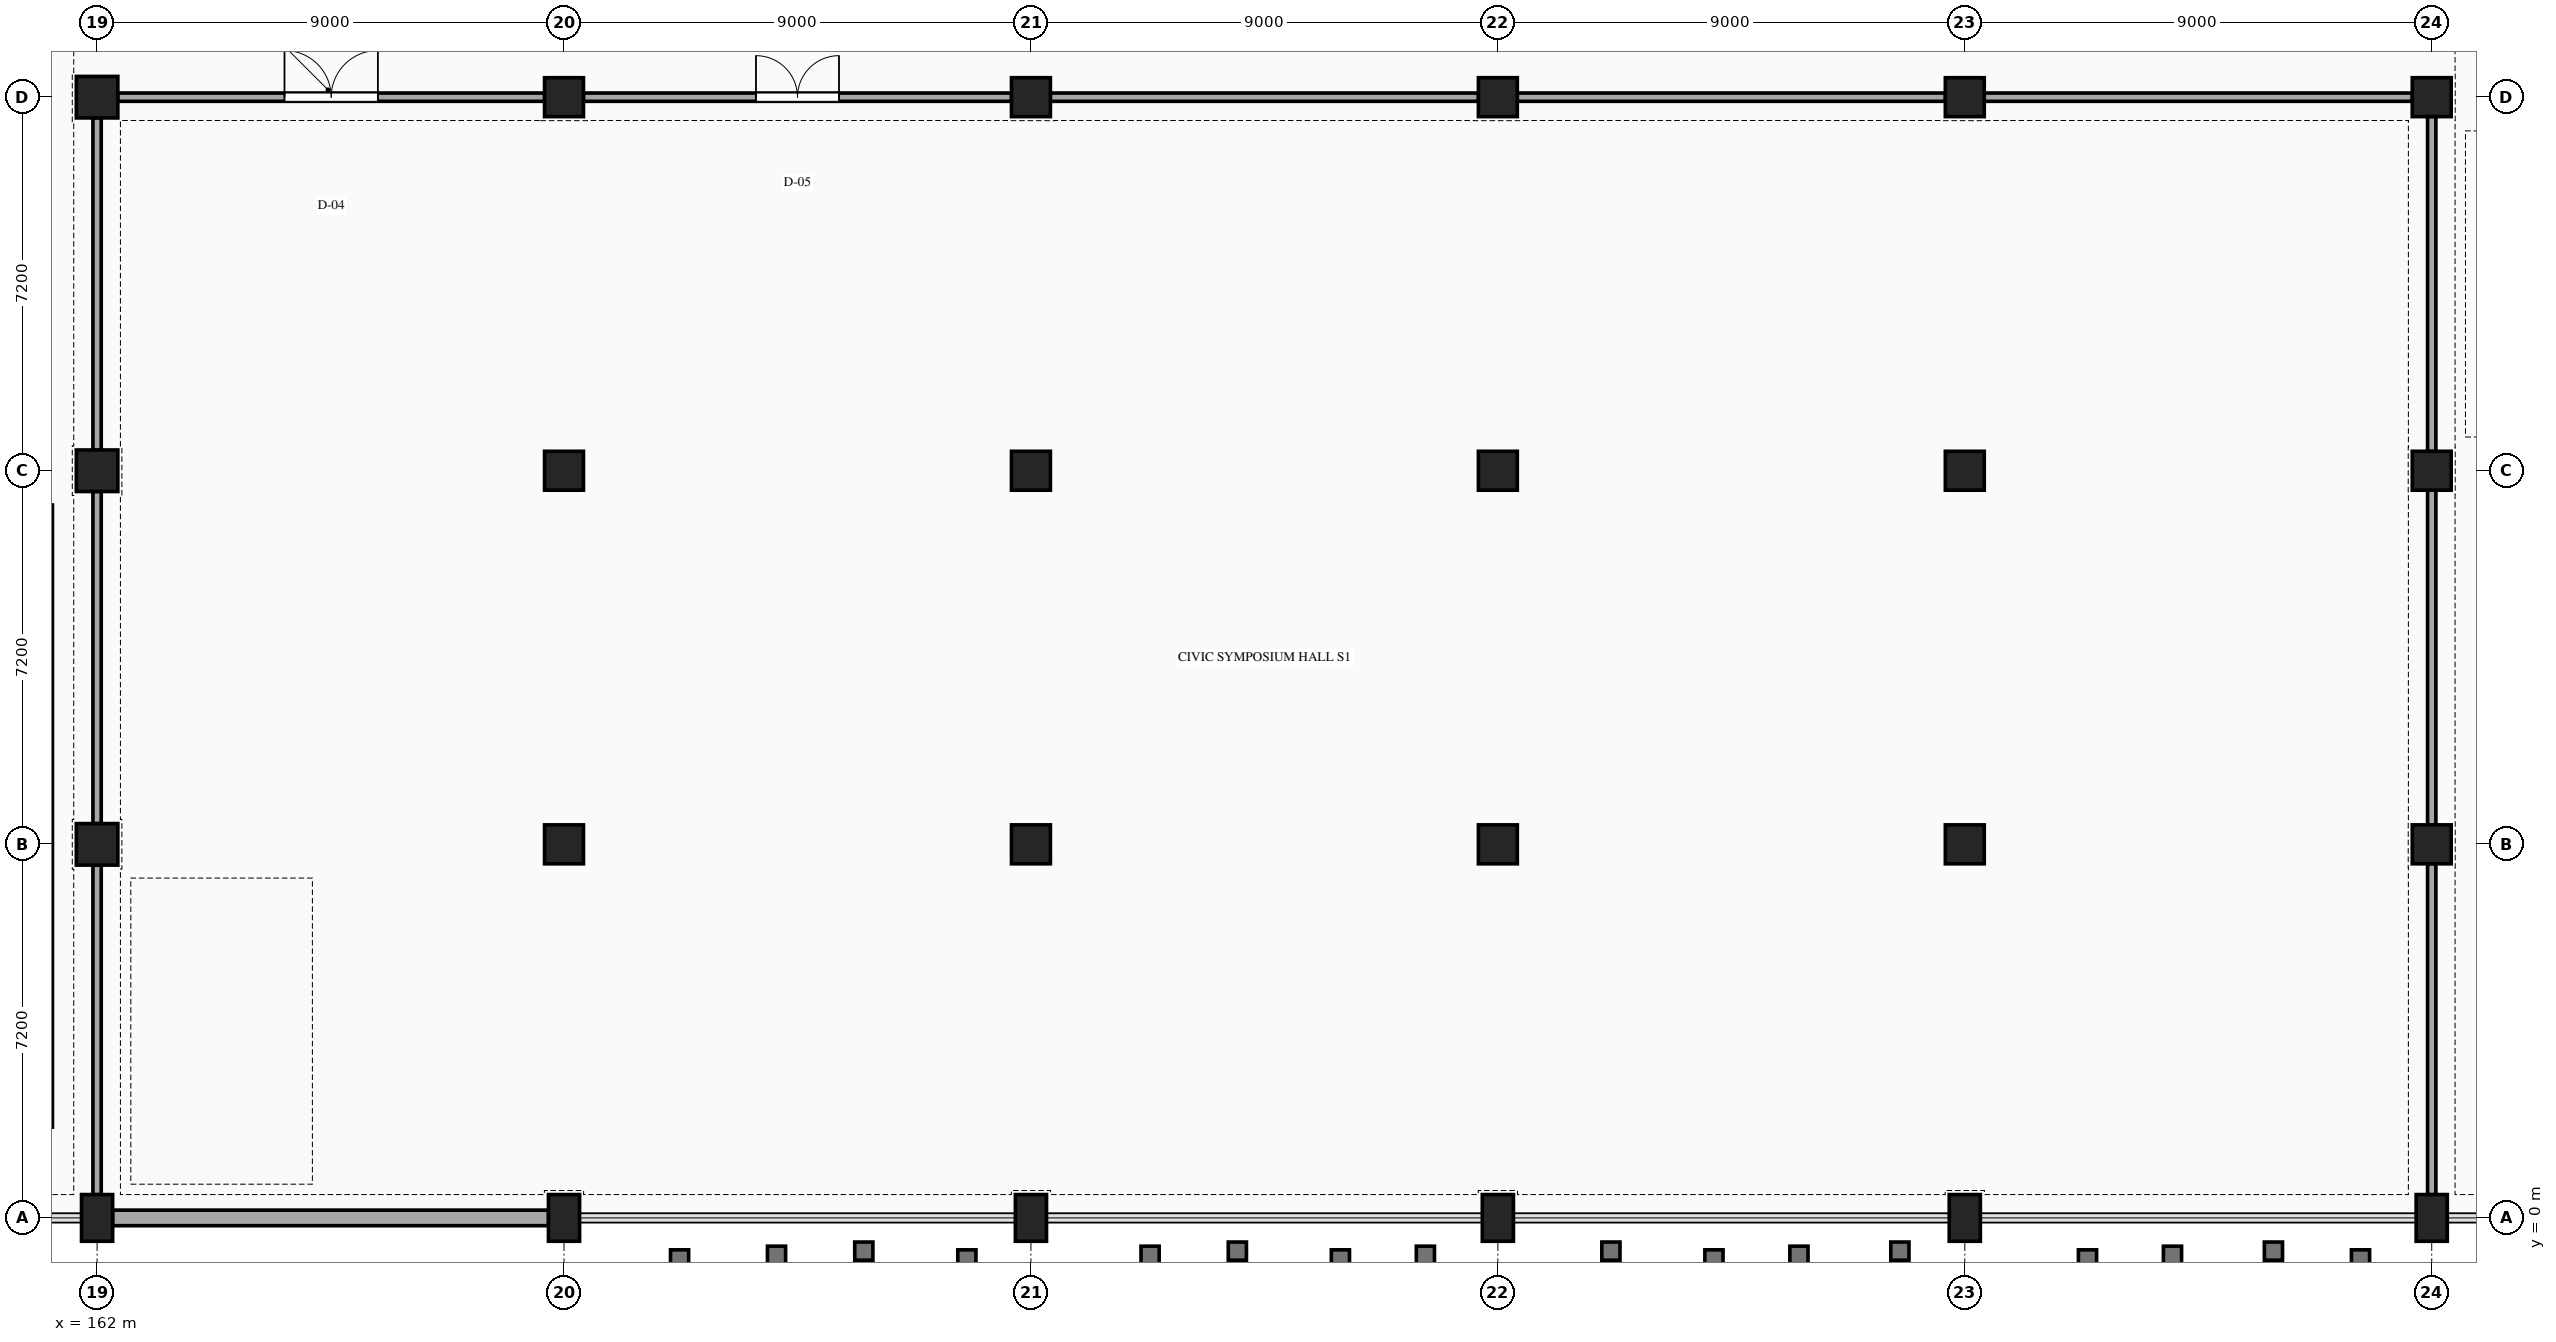
"""IFC4 building model, lengths in metres.
Left out: names, types, materials, properties, quantities, classifications, styles, units other than length and angle.
Written with IfcOpenShell. Run it as: python <this file> out.ifc"""

import sys

from ifc_helpers import new_model, si_unit, direction, frame, frame_2d, origin, origin_2d, place, context, subcontext, project, spatial, rectangle, extrude, element, fill, save


model = new_model("IFC4")
c1 = context("Model", 3, precision=1e-05, world=origin(), true_north=direction((0.0, 1.0)))
c2 = subcontext(c1, "Body", "Model", "MODEL_VIEW")
j1 = project(units=[si_unit("LENGTHUNIT", "METRE"), si_unit("PLANEANGLEUNIT", "RADIAN")], contexts=[c1])
p1 = place(None, origin())
s1 = spatial("IfcSite", under=j1, at=p1, CompositionType="ELEMENT")
p2 = place(p1, origin())
s2 = spatial("IfcBuilding", under=s1, at=p2, CompositionType="ELEMENT")
p3 = place(p2, origin())
s3 = spatial("IfcBuildingStorey", under=s2, at=p3, CompositionType="ELEMENT", Elevation=0.0)
p4 = place(p3, frame((162.0, 0.0, 0.0), z_axis=(0.0, 0.0, 1.0), x_axis=(1.0, 0.0, 0.0)))
e1 = element("IfcColumn", 1, at=p4, inside=s3, PredefinedType="COLUMN", context=c2, shape_type="SweptSolid", body=[
    extrude(rectangle(XDim=0.6, YDim=0.9, at=origin_2d()), origin(), (0.0, 0.0, 1.0), 5.4),
])
for number, where, z_axis, x_axis in (
    (2, (162.0, 7.2, 0.0), (0.0, 0.0, 1.0), (1.0, 0.0, 0.0)),
    (3, (162.0, 14.4, 0.0), (0.0, 0.0, 1.0), (1.0, 0.0, 0.0)),
    (4, (162.0, 21.6, 0.0), (0.0, 0.0, 1.0), (1.0, 0.0, 0.0)),
):
    element("IfcColumn", number, at=place(p3, frame(where, z_axis=z_axis, x_axis=x_axis)), inside=s3, PredefinedType="COLUMN", context=c2, shape_type="SweptSolid", body=[
        extrude(rectangle(XDim=0.8, YDim=0.8, at=origin_2d()), origin(), (0.0, 0.0, 1.0), 5.4),
    ])
p5 = place(p3, frame((171.0, 0.0, 0.0), z_axis=(0.0, 0.0, 1.0), x_axis=(1.0, 0.0, 0.0)))
e5 = element("IfcColumn", 5, at=p5, inside=s3, PredefinedType="COLUMN", context=c2, shape_type="SweptSolid", body=[
    extrude(rectangle(XDim=0.6, YDim=0.9, at=origin_2d()), origin(), (0.0, 0.0, 1.0), 5.4),
])
for number, where, z_axis, x_axis in (
    (6, (171.0, 7.2, 0.0), (0.0, 0.0, 1.0), (1.0, 0.0, 0.0)),
    (7, (171.0, 14.4, 0.0), (0.0, 0.0, 1.0), (1.0, 0.0, 0.0)),
    (8, (171.0, 21.6, 0.0), (0.0, 0.0, 1.0), (1.0, 0.0, 0.0)),
):
    element("IfcColumn", number, at=place(p3, frame(where, z_axis=z_axis, x_axis=x_axis)), inside=s3, PredefinedType="COLUMN", context=c2, shape_type="SweptSolid", body=[
        extrude(rectangle(XDim=0.75, YDim=0.75, at=origin_2d()), origin(), (0.0, 0.0, 1.0), 5.4),
    ])
p6 = place(p3, frame((180.0, 0.0, 0.0), z_axis=(0.0, 0.0, 1.0), x_axis=(1.0, 0.0, 0.0)))
e9 = element("IfcColumn", 9, at=p6, inside=s3, PredefinedType="COLUMN", context=c2, shape_type="SweptSolid", body=[
    extrude(rectangle(XDim=0.6, YDim=0.9, at=origin_2d()), origin(), (0.0, 0.0, 1.0), 5.4),
])
for number, where, z_axis, x_axis in (
    (10, (180.0, 7.2, 0.0), (0.0, 0.0, 1.0), (1.0, 0.0, 0.0)),
    (11, (180.0, 14.4, 0.0), (0.0, 0.0, 1.0), (1.0, 0.0, 0.0)),
    (12, (180.0, 21.6, 0.0), (0.0, 0.0, 1.0), (1.0, 0.0, 0.0)),
):
    element("IfcColumn", number, at=place(p3, frame(where, z_axis=z_axis, x_axis=x_axis)), inside=s3, PredefinedType="COLUMN", context=c2, shape_type="SweptSolid", body=[
        extrude(rectangle(XDim=0.75, YDim=0.75, at=origin_2d()), origin(), (0.0, 0.0, 1.0), 5.4),
    ])
p7 = place(p3, frame((189.0, 0.0, 0.0), z_axis=(0.0, 0.0, 1.0), x_axis=(1.0, 0.0, 0.0)))
e13 = element("IfcColumn", 13, at=p7, inside=s3, PredefinedType="COLUMN", context=c2, shape_type="SweptSolid", body=[
    extrude(rectangle(XDim=0.6, YDim=0.9, at=origin_2d()), origin(), (0.0, 0.0, 1.0), 5.4),
])
for number, where, z_axis, x_axis in (
    (14, (189.0, 7.2, 0.0), (0.0, 0.0, 1.0), (1.0, 0.0, 0.0)),
    (15, (189.0, 14.4, 0.0), (0.0, 0.0, 1.0), (1.0, 0.0, 0.0)),
    (16, (189.0, 21.6, 0.0), (0.0, 0.0, 1.0), (1.0, 0.0, 0.0)),
):
    element("IfcColumn", number, at=place(p3, frame(where, z_axis=z_axis, x_axis=x_axis)), inside=s3, PredefinedType="COLUMN", context=c2, shape_type="SweptSolid", body=[
        extrude(rectangle(XDim=0.75, YDim=0.75, at=origin_2d()), origin(), (0.0, 0.0, 1.0), 5.4),
    ])
p8 = place(p3, frame((198.0, 0.0, 0.0), z_axis=(0.0, 0.0, 1.0), x_axis=(1.0, 0.0, 0.0)))
e17 = element("IfcColumn", 17, at=p8, inside=s3, PredefinedType="COLUMN", context=c2, shape_type="SweptSolid", body=[
    extrude(rectangle(XDim=0.6, YDim=0.9, at=origin_2d()), origin(), (0.0, 0.0, 1.0), 5.4),
])
for number, where, z_axis, x_axis in (
    (18, (198.0, 7.2, 0.0), (0.0, 0.0, 1.0), (1.0, 0.0, 0.0)),
    (19, (198.0, 14.4, 0.0), (0.0, 0.0, 1.0), (1.0, 0.0, 0.0)),
    (20, (198.0, 21.6, 0.0), (0.0, 0.0, 1.0), (1.0, 0.0, 0.0)),
):
    element("IfcColumn", number, at=place(p3, frame(where, z_axis=z_axis, x_axis=x_axis)), inside=s3, PredefinedType="COLUMN", context=c2, shape_type="SweptSolid", body=[
        extrude(rectangle(XDim=0.75, YDim=0.75, at=origin_2d()), origin(), (0.0, 0.0, 1.0), 5.4),
    ])
p9 = place(p3, frame((207.0, 0.0, 0.0), z_axis=(0.0, 0.0, 1.0), x_axis=(1.0, 0.0, 0.0)))
e21 = element("IfcColumn", 21, at=p9, inside=s3, PredefinedType="COLUMN", context=c2, shape_type="SweptSolid", body=[
    extrude(rectangle(XDim=0.6, YDim=0.9, at=origin_2d()), origin(), (0.0, 0.0, 1.0), 5.4),
])
for number, where, z_axis, x_axis in (
    (22, (207.0, 7.2, 0.0), (0.0, 0.0, 1.0), (1.0, 0.0, 0.0)),
    (23, (207.0, 14.4, 0.0), (0.0, 0.0, 1.0), (1.0, 0.0, 0.0)),
    (24, (207.0, 21.6, 0.0), (0.0, 0.0, 1.0), (1.0, 0.0, 0.0)),
):
    element("IfcColumn", number, at=place(p3, frame(where, z_axis=z_axis, x_axis=x_axis)), inside=s3, PredefinedType="COLUMN", context=c2, shape_type="SweptSolid", body=[
        extrude(rectangle(XDim=0.75, YDim=0.75, at=origin_2d()), origin(), (0.0, 0.0, 1.0), 5.4),
    ])
p10 = place(p3, frame((160.97, 13.74, 0.0), z_axis=(0.0, 0.0, 1.0), x_axis=(0.0, -1.0, 0.0)))
e25 = element("IfcWall", 25, at=p10, inside=s3, PredefinedType="SHEAR", context=c2, shape_type="SweptSolid", body=[
    extrude(rectangle(XDim=11.99, YDim=0.34, at=frame_2d((5.995, 0.0))), origin(), (0.0, 0.0, 1.0), 5.12),
])
p11 = place(p3, frame((170.702, 0.0, 0.0), z_axis=(0.0, 0.0, 1.0), x_axis=(-1.0, 0.0, 0.0)))
e26 = element("IfcWall", 26, at=p11, inside=s3, PredefinedType="STANDARD", context=c2, shape_type="SweptSolid", body=[
    extrude(rectangle(XDim=8.404, YDim=0.3, at=frame_2d((4.202, 0.0))), origin(), (0.0, 0.0, 1.0), 4.747),
])
p12 = place(p3, frame((162.398, 21.6, 0.0), z_axis=(0.0, 0.0, 1.0), x_axis=(1.0, 0.0, 0.0)))
e27 = element("IfcWall", 27, at=p12, inside=s3, PredefinedType="PARTITIONING", context=c2, shape_type="SweptSolid", body=[
    extrude(rectangle(XDim=8.229, YDim=0.16, at=frame_2d((4.115, 0.0))), origin(), (0.0, 0.0, 1.0), 4.264),
])
p13 = place(p12, frame((3.215, 0.0, 0.0)))
e28 = element("IfcOpeningElement", 28, at=p13, cuts=e27, PredefinedType="OPENING", context=c2, shape_type="SweptSolid", body=[
    extrude(rectangle(XDim=1.8, YDim=2.25, at=frame_2d((0.9, 1.125))), frame((0.0, 0.09, 0.0), z_axis=(0.0, -1.0, 0.0), x_axis=(1.0, 0.0, 0.0)), (0.0, 0.0, 1.0), 0.18),
])
p14 = place(p3, frame((171.373, 21.6, 0.0), z_axis=(0.0, 0.0, 1.0), x_axis=(1.0, 0.0, 0.0)))
e29 = element("IfcWall", 29, at=p14, inside=s3, PredefinedType="PARTITIONING", context=c2, shape_type="SweptSolid", body=[
    extrude(rectangle(XDim=8.254, YDim=0.16, at=frame_2d((4.127, 0.0))), origin(), (0.0, 0.0, 1.0), 4.264),
])
p15 = place(p14, frame((3.327, 0.0, 0.0)))
e30 = element("IfcOpeningElement", 30, at=p15, cuts=e29, PredefinedType="OPENING", context=c2, shape_type="SweptSolid", body=[
    extrude(rectangle(XDim=1.6, YDim=2.2, at=frame_2d((0.8, 1.1))), frame((0.0, 0.09, 0.0), z_axis=(0.0, -1.0, 0.0), x_axis=(1.0, 0.0, 0.0)), (0.0, 0.0, 1.0), 0.18),
])
for number, where, z_axis, x_axis in (
    (31, (180.373, 21.6, 0.0), (0.0, 0.0, 1.0), (1.0, 0.0, 0.0)),
    (32, (189.373, 21.6, 0.0), (0.0, 0.0, 1.0), (1.0, 0.0, 0.0)),
    (33, (198.373, 21.6, 0.0), (0.0, 0.0, 1.0), (1.0, 0.0, 0.0)),
):
    element("IfcWall", number, at=place(p3, frame(where, z_axis=z_axis, x_axis=x_axis)), inside=s3, PredefinedType="PARTITIONING", context=c2, shape_type="SweptSolid", body=[
        extrude(rectangle(XDim=8.254, YDim=0.16, at=frame_2d((4.127, 0.0))), origin(), (0.0, 0.0, 1.0), 4.264),
    ])
p16 = place(p3, frame((162.0, 0.448, 0.0), z_axis=(0.0, 0.0, 1.0), x_axis=(0.0, 1.0, 0.0)))
e34 = element("IfcWall", 34, at=p16, inside=s3, PredefinedType="PARTITIONING", context=c2, shape_type="SweptSolid", body=[
    extrude(rectangle(XDim=6.354, YDim=0.16, at=frame_2d((3.177, 0.0))), origin(), (0.0, 0.0, 1.0), 4.264),
])
p17 = place(p3, frame((162.0, 7.598, 0.0), z_axis=(0.0, 0.0, 1.0), x_axis=(0.0, 1.0, 0.0)))
e35 = element("IfcWall", 35, at=p17, inside=s3, PredefinedType="PARTITIONING", context=c2, shape_type="SweptSolid", body=[
    extrude(rectangle(XDim=6.404, YDim=0.16, at=frame_2d((3.202, 0.0))), origin(), (0.0, 0.0, 1.0), 4.264),
])
p18 = place(p3, frame((162.0, 14.798, 0.0), z_axis=(0.0, 0.0, 1.0), x_axis=(0.0, 1.0, 0.0)))
e36 = element("IfcWall", 36, at=p18, inside=s3, PredefinedType="PARTITIONING", context=c2, shape_type="SweptSolid", body=[
    extrude(rectangle(XDim=6.404, YDim=0.16, at=frame_2d((3.202, 0.0))), origin(), (0.0, 0.0, 1.0), 4.264),
])
p19 = place(p3, frame((207.0, 0.448, 0.0), z_axis=(0.0, 0.0, 1.0), x_axis=(0.0, 1.0, 0.0)))
e37 = element("IfcWall", 37, at=p19, inside=s3, PredefinedType="PARTITIONING", context=c2, shape_type="SweptSolid", body=[
    extrude(rectangle(XDim=6.379, YDim=0.16, at=frame_2d((3.189, 0.0))), origin(), (0.0, 0.0, 1.0), 4.264),
])
for number, where, z_axis, x_axis in (
    (38, (207.0, 7.573, 0.0), (0.0, 0.0, 1.0), (0.0, 1.0, 0.0)),
    (39, (207.0, 14.773, 0.0), (0.0, 0.0, 1.0), (0.0, 1.0, 0.0)),
):
    element("IfcWall", number, at=place(p3, frame(where, z_axis=z_axis, x_axis=x_axis)), inside=s3, PredefinedType="PARTITIONING", context=c2, shape_type="SweptSolid", body=[
        extrude(rectangle(XDim=6.454, YDim=0.16, at=frame_2d((3.227, 0.0))), origin(), (0.0, 0.0, 1.0), 4.264),
    ])
p20 = place(p13, origin())
e40 = element("IfcDoor", 40, at=p20, inside=s3, OperationType="DOUBLE_DOOR_SINGLE_SWING", PredefinedType="DOOR", context=c2, shape_type="SweptSolid", body=[
    extrude(rectangle(XDim=1.8, YDim=2.25, at=frame_2d((0.9, 1.125))), frame((0.0, 0.025, 0.0), z_axis=(0.0, -1.0, 0.0), x_axis=(1.0, 0.0, 0.0)), (0.0, 0.0, 1.0), 0.05),
])
fill(e28, e40)
p21 = place(p15, origin())
e41 = element("IfcDoor", 41, at=p21, inside=s3, OperationType="DOUBLE_DOOR_SINGLE_SWING", PredefinedType="DOOR", context=c2, shape_type="SweptSolid", body=[
    extrude(rectangle(XDim=1.6, YDim=2.2, at=frame_2d((0.8, 1.1))), frame((0.0, 0.025, 0.0), z_axis=(0.0, -1.0, 0.0), x_axis=(1.0, 0.0, 0.0)), (0.0, 0.0, 1.0), 0.05),
])
fill(e30, e41)
save(model, sys.argv[1])
